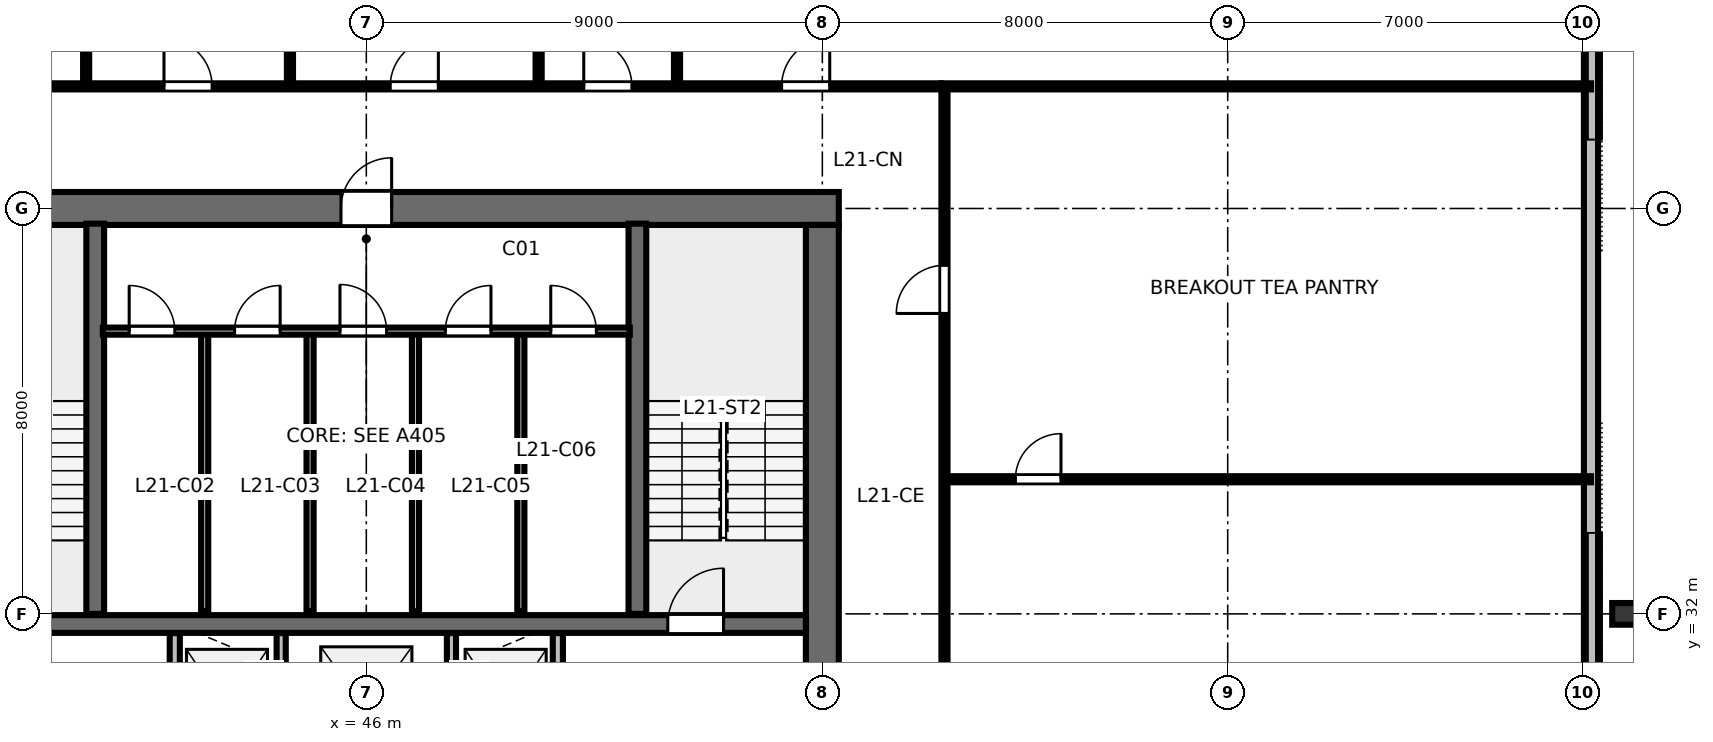
"""IFC4 building model, lengths in metres.
Left out: names, types, materials, properties, quantities, classifications, styles, units other than length and angle.
Written with IfcOpenShell. Run it as: python <this file> out.ifc"""

import sys

from ifc_helpers import new_model, si_unit, direction, frame, frame_2d, origin, origin_2d, place, context, subcontext, project, spatial, rectangle, i_section, extrude, element, fill, save


model = new_model("IFC4")
c1 = context("Model", 3, precision=1e-05, world=origin(), true_north=direction((0.0, 1.0)))
c2 = subcontext(c1, "Body", "Model", "MODEL_VIEW")
j1 = project(units=[si_unit("LENGTHUNIT", "METRE"), si_unit("PLANEANGLEUNIT", "RADIAN")], contexts=[c1])
p1 = place(None, origin())
s1 = spatial("IfcSite", under=j1, at=p1, CompositionType="ELEMENT")
p2 = place(p1, origin())
s2 = spatial("IfcBuilding", under=s1, at=p2, CompositionType="ELEMENT")
p3 = place(p2, frame((0.0, 0.0, 82.0)))
s3 = spatial("IfcBuildingStorey", under=s2, at=p3, CompositionType="ELEMENT", Elevation=82.0)
p4 = place(p3, frame((36.675, 40.0, 0.0), z_axis=(0.0, 0.0, 1.0), x_axis=(1.0, 0.0, 0.0)))
e1 = element("IfcWall", 1, at=p4, inside=s3, PredefinedType="SHEAR", context=c2, shape_type="SweptSolid", body=[
    extrude(rectangle(XDim=18.65, YDim=0.65, at=frame_2d((9.325, 0.0))), origin(), (0.0, 0.0, 1.0), 3.28),
])
p5 = place(p4, frame((8.825, 0.0, 0.0)))
e2 = element("IfcOpeningElement", 2, at=p5, cuts=e1, PredefinedType="OPENING", context=c2, shape_type="SweptSolid", body=[
    extrude(rectangle(XDim=1.0, YDim=2.15, at=frame_2d((0.5, 1.075))), frame((0.0, 0.335, 0.0), z_axis=(0.0, -1.0, 0.0), x_axis=(1.0, 0.0, 0.0)), (0.0, 0.0, 1.0), 0.67),
])
p6 = place(p3, frame((55.0, 24.325, 0.0), z_axis=(0.0, 0.0, 1.0), x_axis=(0.0, 1.0, 0.0)))
e3 = element("IfcWall", 3, at=p6, inside=s3, PredefinedType="SHEAR", context=c2, shape_type="SweptSolid", body=[
    extrude(rectangle(XDim=15.35, YDim=0.65, at=frame_2d((7.675, 0.0))), origin(), (0.0, 0.0, 1.0), 3.28),
])
p7 = place(p6, frame((5.2, 0.0, 0.0)))
e4 = element("IfcOpeningElement", 4, at=p7, cuts=e3, PredefinedType="OPENING", context=c2, shape_type="SweptSolid", body=[
    extrude(rectangle(XDim=1.15, YDim=2.15, at=frame_2d((0.575, 1.075))), frame((0.0, 0.335, 0.0), z_axis=(0.0, -1.0, 0.0), x_axis=(1.0, 0.0, 0.0)), (0.0, 0.0, 1.0), 0.67),
])
p8 = place(p3, frame((37.325, 31.8, 0.0), z_axis=(0.0, 0.0, 1.0), x_axis=(1.0, 0.0, 0.0)))
e5 = element("IfcWall", 5, at=p8, inside=s3, PredefinedType="SHEAR", context=c2, shape_type="SweptSolid", body=[
    extrude(rectangle(XDim=17.35, YDim=0.35, at=frame_2d((8.675, 0.0))), origin(), (0.0, 0.0, 1.0), 3.28),
])
p9 = place(p8, frame((0.725, 0.0, 0.0)))
e6 = element("IfcOpeningElement", 6, at=p9, cuts=e5, PredefinedType="OPENING", context=c2, shape_type="SweptSolid", body=[
    extrude(rectangle(XDim=1.1, YDim=2.15, at=frame_2d((0.55, 1.075))), frame((0.0, 0.185, 0.0), z_axis=(0.0, -1.0, 0.0), x_axis=(1.0, 0.0, 0.0)), (0.0, 0.0, 1.0), 0.37),
])
p10 = place(p8, frame((14.625, 0.0, 0.0)))
e7 = element("IfcOpeningElement", 7, at=p10, cuts=e5, PredefinedType="OPENING", context=c2, shape_type="SweptSolid", body=[
    extrude(rectangle(XDim=1.1, YDim=2.15, at=frame_2d((0.55, 1.075))), frame((0.0, 0.185, 0.0), z_axis=(0.0, -1.0, 0.0), x_axis=(1.0, 0.0, 0.0)), (0.0, 0.0, 1.0), 0.37),
])
p11 = place(p3, frame((70.83, 32.0, 0.0), z_axis=(-0.06599123705, 0.0, 0.997820202558), x_axis=(0.997820202558, 0.0, 0.06599123705)))
e8 = element("IfcColumn", 8, at=p11, inside=s3, PredefinedType="COLUMN", context=c2, shape_type="SweptSolid", body=[
    extrude(i_section(OverallWidth=0.428, OverallDepth=0.483, WebThickness=0.051, FlangeThickness=0.082, FilletRadius=0.025, at=origin_2d()), origin(), (0.0, 0.0, 1.0), 3.285),
])
p12 = place(p3, frame((70.17, 14.66, 0.0), z_axis=(0.0, 0.0, 1.0), x_axis=(0.0, 1.0, 0.0)))
e9 = element("IfcWall", 9, at=p12, inside=s3, PredefinedType="STANDARD", context=c2, shape_type="SweptSolid", body=[
    extrude(rectangle(XDim=34.68, YDim=0.28, at=frame_2d((17.34, 0.0))), origin(), (0.0, 0.0, 1.0), 3.28),
])
for number, where, z_axis, x_axis in (
    (10, (40.65, 32.0, 0.0), (0.0, 0.0, 1.0), (0.0, 1.0, 0.0)),
    (11, (51.35, 32.0, 0.0), (0.0, 0.0, 1.0), (0.0, 1.0, 0.0)),
):
    element("IfcWall", number, at=place(p3, frame(where, z_axis=z_axis, x_axis=x_axis)), inside=s3, PredefinedType="SHEAR", context=c2, shape_type="SweptSolid", body=[
        extrude(rectangle(XDim=7.7, YDim=0.35, at=frame_2d((3.85, 0.0))), origin(), (0.0, 0.0, 1.0), 3.6),
    ])
for number, where, z_axis, x_axis in (
    (12, (42.81, 32.05, 0.0), (0.0, 0.0, 1.0), (0.0, 1.0, 0.0)),
    (13, (44.89, 32.05, 0.0), (0.0, 0.0, 1.0), (0.0, 1.0, 0.0)),
    (14, (46.97, 32.05, 0.0), (0.0, 0.0, 1.0), (0.0, 1.0, 0.0)),
    (15, (49.05, 32.05, 0.0), (0.0, 0.0, 1.0), (0.0, 1.0, 0.0)),
):
    element("IfcWall", number, at=place(p3, frame(where, z_axis=z_axis, x_axis=x_axis)), inside=s3, PredefinedType="PARTITIONING", context=c2, shape_type="SweptSolid", body=[
        extrude(rectangle(XDim=5.5, YDim=0.14, at=frame_2d((2.75, 0.0))), origin(), (0.0, 0.0, 1.0), 3.28),
    ])
p13 = place(p3, frame((40.8, 37.58, 0.0), z_axis=(0.0, 0.0, 1.0), x_axis=(1.0, 0.0, 0.0)))
e16 = element("IfcWall", 16, at=p13, inside=s3, PredefinedType="PARTITIONING", context=c2, shape_type="SweptSolid", body=[
    extrude(rectangle(XDim=10.4, YDim=0.14, at=frame_2d((5.2, 0.0))), origin(), (0.0, 0.0, 1.0), 3.28),
])
p14 = place(p13, frame((0.52, 0.0, 0.0)))
e17 = element("IfcOpeningElement", 17, at=p14, cuts=e16, PredefinedType="OPENING", context=c2, shape_type="SweptSolid", body=[
    extrude(rectangle(XDim=0.9, YDim=2.15, at=frame_2d((0.45, 1.075))), frame((0.0, 0.08, 0.0), z_axis=(0.0, -1.0, 0.0), x_axis=(1.0, 0.0, 0.0)), (0.0, 0.0, 1.0), 0.16),
])
p15 = place(p13, frame((2.6, 0.0, 0.0)))
e18 = element("IfcOpeningElement", 18, at=p15, cuts=e16, PredefinedType="OPENING", context=c2, shape_type="SweptSolid", body=[
    extrude(rectangle(XDim=0.9, YDim=2.15, at=frame_2d((0.45, 1.075))), frame((0.0, 0.08, 0.0), z_axis=(0.0, -1.0, 0.0), x_axis=(1.0, 0.0, 0.0)), (0.0, 0.0, 1.0), 0.16),
])
p16 = place(p13, frame((4.68, 0.0, 0.0)))
e19 = element("IfcOpeningElement", 19, at=p16, cuts=e16, PredefinedType="OPENING", context=c2, shape_type="SweptSolid", body=[
    extrude(rectangle(XDim=0.92, YDim=2.15, at=frame_2d((0.46, 1.075))), frame((0.0, 0.08, 0.0), z_axis=(0.0, -1.0, 0.0), x_axis=(1.0, 0.0, 0.0)), (0.0, 0.0, 1.0), 0.16),
])
p17 = place(p13, frame((6.76, 0.0, 0.0)))
e20 = element("IfcOpeningElement", 20, at=p17, cuts=e16, PredefinedType="OPENING", context=c2, shape_type="SweptSolid", body=[
    extrude(rectangle(XDim=0.9, YDim=2.15, at=frame_2d((0.45, 1.075))), frame((0.0, 0.08, 0.0), z_axis=(0.0, -1.0, 0.0), x_axis=(1.0, 0.0, 0.0)), (0.0, 0.0, 1.0), 0.16),
])
p18 = place(p13, frame((8.84, 0.0, 0.0)))
e21 = element("IfcOpeningElement", 21, at=p18, cuts=e16, PredefinedType="OPENING", context=c2, shape_type="SweptSolid", body=[
    extrude(rectangle(XDim=0.9, YDim=2.15, at=frame_2d((0.45, 1.075))), frame((0.0, 0.08, 0.0), z_axis=(0.0, -1.0, 0.0), x_axis=(1.0, 0.0, 0.0)), (0.0, 0.0, 1.0), 0.16),
])
p19 = place(p3, frame((42.22, 28.58, 0.0), z_axis=(0.0, 0.0, 1.0), x_axis=(0.0, 1.0, 0.0)))
e22 = element("IfcWall", 22, at=p19, inside=s3, PredefinedType="PARTITIONING", context=c2, shape_type="SweptSolid", body=[
    extrude(rectangle(XDim=3.04, YDim=0.2, at=frame_2d((1.52, 0.0))), origin(), (0.0, 0.0, 1.0), 3.28),
])
p20 = place(p19, frame((0.95, 0.0, 0.0)))
e23 = element("IfcOpeningElement", 23, at=p20, cuts=e22, PredefinedType="OPENING", context=c2, shape_type="SweptSolid", body=[
    extrude(rectangle(XDim=1.05, YDim=2.15, at=frame_2d((0.525, 1.075))), frame((0.0, 0.11, 0.0), z_axis=(0.0, -1.0, 0.0), x_axis=(1.0, 0.0, 0.0)), (0.0, 0.0, 1.0), 0.22),
])
p21 = place(p3, frame((49.78, 28.58, 0.0), z_axis=(0.0, 0.0, 1.0), x_axis=(0.0, 1.0, 0.0)))
e24 = element("IfcWall", 24, at=p21, inside=s3, PredefinedType="PARTITIONING", context=c2, shape_type="SweptSolid", body=[
    extrude(rectangle(XDim=3.04, YDim=0.2, at=frame_2d((1.52, 0.0))), origin(), (0.0, 0.0, 1.0), 3.28),
])
p22 = place(p21, frame((0.95, 0.0, 0.0)))
e25 = element("IfcOpeningElement", 25, at=p22, cuts=e24, PredefinedType="OPENING", context=c2, shape_type="SweptSolid", body=[
    extrude(rectangle(XDim=1.05, YDim=2.15, at=frame_2d((0.525, 1.075))), frame((0.0, 0.11, 0.0), z_axis=(0.0, -1.0, 0.0), x_axis=(1.0, 0.0, 0.0)), (0.0, 0.0, 1.0), 0.22),
])
for number, where, z_axis, x_axis in (
    (26, (44.32, 28.58, 0.0), (0.0, 0.0, 1.0), (0.0, 1.0, 0.0)),
    (27, (47.68, 28.58, 0.0), (0.0, 0.0, 1.0), (0.0, 1.0, 0.0)),
):
    element("IfcWall", number, at=place(p3, frame(where, z_axis=z_axis, x_axis=x_axis)), inside=s3, PredefinedType="PARTITIONING", context=c2, shape_type="SweptSolid", body=[
        extrude(rectangle(XDim=3.04, YDim=0.18, at=frame_2d((1.52, 0.0))), origin(), (0.0, 0.0, 1.0), 3.28),
    ])
p23 = place(p3, frame((40.471, 42.41, 0.0), z_axis=(0.0, 0.0, 1.0), x_axis=(0.0, 1.0, 0.0)))
e28 = element("IfcWall", 28, at=p23, inside=s3, PredefinedType="PARTITIONING", context=c2, shape_type="SweptSolid", body=[
    extrude(rectangle(XDim=10.86, YDim=0.12, at=frame_2d((5.43, 0.0))), origin(), (0.0, 0.0, 1.0), 2.56),
])
p24 = place(p23, frame((1.4, 0.0, 0.0)))
e29 = element("IfcOpeningElement", 29, at=p24, cuts=e28, PredefinedType="OPENING", context=c2, shape_type="SweptSolid", body=[
    extrude(rectangle(XDim=0.9, YDim=2.15, at=frame_2d((0.45, 1.075))), frame((0.0, 0.07, 0.0), z_axis=(0.0, -1.0, 0.0), x_axis=(1.0, 0.0, 0.0)), (0.0, 0.0, 1.0), 0.14),
])
p25 = place(p3, frame((44.493, 42.41, 0.0), z_axis=(0.0, 0.0, 1.0), x_axis=(0.0, 1.0, 0.0)))
e30 = element("IfcWall", 30, at=p25, inside=s3, PredefinedType="PARTITIONING", context=c2, shape_type="SweptSolid", body=[
    extrude(rectangle(XDim=10.86, YDim=0.12, at=frame_2d((5.43, 0.0))), origin(), (0.0, 0.0, 1.0), 2.56),
])
p26 = place(p25, frame((1.4, 0.0, 0.0)))
e31 = element("IfcOpeningElement", 31, at=p26, cuts=e30, PredefinedType="OPENING", context=c2, shape_type="SweptSolid", body=[
    extrude(rectangle(XDim=0.9, YDim=2.15, at=frame_2d((0.45, 1.075))), frame((0.0, 0.07, 0.0), z_axis=(0.0, -1.0, 0.0), x_axis=(1.0, 0.0, 0.0)), (0.0, 0.0, 1.0), 0.14),
])
p27 = place(p3, frame((49.401, 42.41, 0.0), z_axis=(0.0, 0.0, 1.0), x_axis=(0.0, 1.0, 0.0)))
e32 = element("IfcWall", 32, at=p27, inside=s3, PredefinedType="PARTITIONING", context=c2, shape_type="SweptSolid", body=[
    extrude(rectangle(XDim=10.86, YDim=0.12, at=frame_2d((5.43, 0.0))), origin(), (0.0, 0.0, 1.0), 2.56),
])
p28 = place(p27, frame((1.4, 0.0, 0.0)))
e33 = element("IfcOpeningElement", 33, at=p28, cuts=e32, PredefinedType="OPENING", context=c2, shape_type="SweptSolid", body=[
    extrude(rectangle(XDim=0.9, YDim=2.15, at=frame_2d((0.45, 1.075))), frame((0.0, 0.07, 0.0), z_axis=(0.0, -1.0, 0.0), x_axis=(1.0, 0.0, 0.0)), (0.0, 0.0, 1.0), 0.14),
])
p29 = place(p3, frame((52.132, 42.41, 0.0), z_axis=(0.0, 0.0, 1.0), x_axis=(0.0, 1.0, 0.0)))
e34 = element("IfcWall", 34, at=p29, inside=s3, PredefinedType="PARTITIONING", context=c2, shape_type="SweptSolid", body=[
    extrude(rectangle(XDim=10.86, YDim=0.12, at=frame_2d((5.43, 0.0))), origin(), (0.0, 0.0, 1.0), 2.56),
])
p30 = place(p29, frame((1.4, 0.0, 0.0)))
e35 = element("IfcOpeningElement", 35, at=p30, cuts=e34, PredefinedType="OPENING", context=c2, shape_type="SweptSolid", body=[
    extrude(rectangle(XDim=0.9, YDim=2.15, at=frame_2d((0.45, 1.075))), frame((0.0, 0.07, 0.0), z_axis=(0.0, -1.0, 0.0), x_axis=(1.0, 0.0, 0.0)), (0.0, 0.0, 1.0), 0.14),
])
p31 = place(p3, frame((34.65, 42.41, 0.0), z_axis=(0.0, 0.0, 1.0), x_axis=(1.0, 0.0, 0.0)))
e36 = element("IfcWall", 36, at=p31, inside=s3, PredefinedType="PARTITIONING", context=c2, shape_type="SweptSolid", body=[
    extrude(rectangle(XDim=22.7, YDim=0.12, at=frame_2d((11.35, 0.0))), origin(), (0.0, 0.0, 1.0), 2.56),
])
p32 = place(p31, frame((2.505, 0.0, 0.0)))
e37 = element("IfcOpeningElement", 37, at=p32, cuts=e36, PredefinedType="OPENING", context=c2, shape_type="SweptSolid", body=[
    extrude(rectangle(XDim=0.95, YDim=2.15, at=frame_2d((0.475, 1.075))), frame((0.0, 0.07, 0.0), z_axis=(0.0, -1.0, 0.0), x_axis=(1.0, 0.0, 0.0)), (0.0, 0.0, 1.0), 0.14),
])
p33 = place(p31, frame((7.357, 0.0, 0.0)))
e38 = element("IfcOpeningElement", 38, at=p33, cuts=e36, PredefinedType="OPENING", context=c2, shape_type="SweptSolid", body=[
    extrude(rectangle(XDim=0.95, YDim=2.15, at=frame_2d((0.475, 1.075))), frame((0.0, 0.07, 0.0), z_axis=(0.0, -1.0, 0.0), x_axis=(1.0, 0.0, 0.0)), (0.0, 0.0, 1.0), 0.14),
])
p34 = place(p31, frame((11.822, 0.0, 0.0)))
e39 = element("IfcOpeningElement", 39, at=p34, cuts=e36, PredefinedType="OPENING", context=c2, shape_type="SweptSolid", body=[
    extrude(rectangle(XDim=0.95, YDim=2.15, at=frame_2d((0.475, 1.075))), frame((0.0, 0.07, 0.0), z_axis=(0.0, -1.0, 0.0), x_axis=(1.0, 0.0, 0.0)), (0.0, 0.0, 1.0), 0.14),
])
p35 = place(p31, frame((15.641, 0.0, 0.0)))
e40 = element("IfcOpeningElement", 40, at=p35, cuts=e36, PredefinedType="OPENING", context=c2, shape_type="SweptSolid", body=[
    extrude(rectangle(XDim=0.95, YDim=2.15, at=frame_2d((0.475, 1.075))), frame((0.0, 0.07, 0.0), z_axis=(0.0, -1.0, 0.0), x_axis=(1.0, 0.0, 0.0)), (0.0, 0.0, 1.0), 0.14),
])
p36 = place(p31, frame((19.546, 0.0, 0.0)))
e41 = element("IfcOpeningElement", 41, at=p36, cuts=e36, PredefinedType="OPENING", context=c2, shape_type="SweptSolid", body=[
    extrude(rectangle(XDim=0.95, YDim=2.15, at=frame_2d((0.475, 1.075))), frame((0.0, 0.07, 0.0), z_axis=(0.0, -1.0, 0.0), x_axis=(1.0, 0.0, 0.0)), (0.0, 0.0, 1.0), 0.14),
])
p37 = place(p3, frame((57.41, 34.656, 0.0), z_axis=(0.0, 0.0, 1.0), x_axis=(1.0, 0.0, 0.0)))
e42 = element("IfcWall", 42, at=p37, inside=s3, PredefinedType="PARTITIONING", context=c2, shape_type="SweptSolid", body=[
    extrude(rectangle(XDim=12.76, YDim=0.12, at=frame_2d((6.38, 0.0))), origin(), (0.0, 0.0, 1.0), 2.56),
])
p38 = place(p37, frame((1.4, 0.0, 0.0)))
e43 = element("IfcOpeningElement", 43, at=p38, cuts=e42, PredefinedType="OPENING", context=c2, shape_type="SweptSolid", body=[
    extrude(rectangle(XDim=0.9, YDim=2.15, at=frame_2d((0.45, 1.075))), frame((0.0, 0.07, 0.0), z_axis=(0.0, -1.0, 0.0), x_axis=(1.0, 0.0, 0.0)), (0.0, 0.0, 1.0), 0.14),
])
p39 = place(p3, frame((57.41, 21.65, 0.0), z_axis=(0.0, 0.0, 1.0), x_axis=(0.0, 1.0, 0.0)))
e44 = element("IfcWall", 44, at=p39, inside=s3, PredefinedType="PARTITIONING", context=c2, shape_type="SweptSolid", body=[
    extrude(rectangle(XDim=20.7, YDim=0.12, at=frame_2d((10.35, 0.0))), origin(), (0.0, 0.0, 1.0), 2.56),
])
p40 = place(p39, frame((6.128, 0.0, 0.0)))
e45 = element("IfcOpeningElement", 45, at=p40, cuts=e44, PredefinedType="OPENING", context=c2, shape_type="SweptSolid", body=[
    extrude(rectangle(XDim=0.95, YDim=2.15, at=frame_2d((0.475, 1.075))), frame((0.0, 0.07, 0.0), z_axis=(0.0, -1.0, 0.0), x_axis=(1.0, 0.0, 0.0)), (0.0, 0.0, 1.0), 0.14),
])
p41 = place(p39, frame((16.278, 0.0, 0.0)))
e46 = element("IfcOpeningElement", 46, at=p41, cuts=e44, PredefinedType="OPENING", context=c2, shape_type="SweptSolid", body=[
    extrude(rectangle(XDim=0.95, YDim=2.15, at=frame_2d((0.475, 1.075))), frame((0.0, 0.07, 0.0), z_axis=(0.0, -1.0, 0.0), x_axis=(1.0, 0.0, 0.0)), (0.0, 0.0, 1.0), 0.14),
])
p42 = place(p3, frame((57.35, 42.41, 0.0), z_axis=(0.0, 0.0, 1.0), x_axis=(1.0, 0.0, 0.0)))
e47 = element("IfcWall", 47, at=p42, inside=s3, PredefinedType="PARTITIONING", context=c2, shape_type="SweptSolid", body=[
    extrude(rectangle(XDim=12.82, YDim=0.12, at=frame_2d((6.41, 0.0))), origin(), (0.0, 0.0, 1.0), 2.56),
])
p43 = place(p10, origin())
e48 = element("IfcDoor", 48, at=p43, inside=s3, OperationType="SINGLE_SWING_RIGHT", PredefinedType="DOOR", context=c2, shape_type="SweptSolid", body=[
    extrude(rectangle(XDim=1.1, YDim=2.15, at=frame_2d((0.55, 1.075))), frame((0.0, 0.025, 0.0), z_axis=(0.0, -1.0, 0.0), x_axis=(1.0, 0.0, 0.0)), (0.0, 0.0, 1.0), 0.05),
])
fill(e7, e48)
p44 = place(p5, origin())
e49 = element("IfcDoor", 49, at=p44, inside=s3, OperationType="SINGLE_SWING_RIGHT", PredefinedType="DOOR", context=c2, shape_type="SweptSolid", body=[
    extrude(rectangle(XDim=1.0, YDim=2.15, at=frame_2d((0.5, 1.075))), frame((0.0, 0.025, 0.0), z_axis=(0.0, -1.0, 0.0), x_axis=(1.0, 0.0, 0.0)), (0.0, 0.0, 1.0), 0.05),
])
fill(e2, e49)
p45 = place(p14, origin())
e50 = element("IfcDoor", 50, at=p45, inside=s3, OperationType="SINGLE_SWING_LEFT", PredefinedType="DOOR", context=c2, shape_type="SweptSolid", body=[
    extrude(rectangle(XDim=0.9, YDim=2.15, at=frame_2d((0.45, 1.075))), frame((0.0, 0.025, 0.0), z_axis=(0.0, -1.0, 0.0), x_axis=(1.0, 0.0, 0.0)), (0.0, 0.0, 1.0), 0.05),
])
fill(e17, e50)
p46 = place(p15, origin())
e51 = element("IfcDoor", 51, at=p46, inside=s3, OperationType="SINGLE_SWING_RIGHT", PredefinedType="DOOR", context=c2, shape_type="SweptSolid", body=[
    extrude(rectangle(XDim=0.9, YDim=2.15, at=frame_2d((0.45, 1.075))), frame((0.0, 0.025, 0.0), z_axis=(0.0, -1.0, 0.0), x_axis=(1.0, 0.0, 0.0)), (0.0, 0.0, 1.0), 0.05),
])
fill(e18, e51)
p47 = place(p16, origin())
e52 = element("IfcDoor", 52, at=p47, inside=s3, OperationType="SINGLE_SWING_LEFT", PredefinedType="DOOR", context=c2, shape_type="SweptSolid", body=[
    extrude(rectangle(XDim=0.92, YDim=2.15, at=frame_2d((0.46, 1.075))), frame((0.0, 0.025, 0.0), z_axis=(0.0, -1.0, 0.0), x_axis=(1.0, 0.0, 0.0)), (0.0, 0.0, 1.0), 0.05),
])
fill(e19, e52)
p48 = place(p17, origin())
e53 = element("IfcDoor", 53, at=p48, inside=s3, OperationType="SINGLE_SWING_RIGHT", PredefinedType="DOOR", context=c2, shape_type="SweptSolid", body=[
    extrude(rectangle(XDim=0.9, YDim=2.15, at=frame_2d((0.45, 1.075))), frame((0.0, 0.025, 0.0), z_axis=(0.0, -1.0, 0.0), x_axis=(1.0, 0.0, 0.0)), (0.0, 0.0, 1.0), 0.05),
])
fill(e20, e53)
p49 = place(p18, origin())
e54 = element("IfcDoor", 54, at=p49, inside=s3, OperationType="SINGLE_SWING_LEFT", PredefinedType="DOOR", context=c2, shape_type="SweptSolid", body=[
    extrude(rectangle(XDim=0.9, YDim=2.15, at=frame_2d((0.45, 1.075))), frame((0.0, 0.025, 0.0), z_axis=(0.0, -1.0, 0.0), x_axis=(1.0, 0.0, 0.0)), (0.0, 0.0, 1.0), 0.05),
])
fill(e21, e54)
p50 = place(p33, origin())
e55 = element("IfcDoor", 55, at=p50, inside=s3, OperationType="SINGLE_SWING_LEFT", PredefinedType="DOOR", context=c2, shape_type="SweptSolid", body=[
    extrude(rectangle(XDim=0.95, YDim=2.15, at=frame_2d((0.475, 1.075))), frame((0.0, 0.025, 0.0), z_axis=(0.0, -1.0, 0.0), x_axis=(1.0, 0.0, 0.0)), (0.0, 0.0, 1.0), 0.05),
])
fill(e38, e55)
p51 = place(p34, origin())
e56 = element("IfcDoor", 56, at=p51, inside=s3, OperationType="SINGLE_SWING_RIGHT", PredefinedType="DOOR", context=c2, shape_type="SweptSolid", body=[
    extrude(rectangle(XDim=0.95, YDim=2.15, at=frame_2d((0.475, 1.075))), frame((0.0, 0.025, 0.0), z_axis=(0.0, -1.0, 0.0), x_axis=(1.0, 0.0, 0.0)), (0.0, 0.0, 1.0), 0.05),
])
fill(e39, e56)
p52 = place(p35, origin())
e57 = element("IfcDoor", 57, at=p52, inside=s3, OperationType="SINGLE_SWING_LEFT", PredefinedType="DOOR", context=c2, shape_type="SweptSolid", body=[
    extrude(rectangle(XDim=0.95, YDim=2.15, at=frame_2d((0.475, 1.075))), frame((0.0, 0.025, 0.0), z_axis=(0.0, -1.0, 0.0), x_axis=(1.0, 0.0, 0.0)), (0.0, 0.0, 1.0), 0.05),
])
fill(e40, e57)
p53 = place(p36, origin())
e58 = element("IfcDoor", 58, at=p53, inside=s3, OperationType="SINGLE_SWING_RIGHT", PredefinedType="DOOR", context=c2, shape_type="SweptSolid", body=[
    extrude(rectangle(XDim=0.95, YDim=2.15, at=frame_2d((0.475, 1.075))), frame((0.0, 0.025, 0.0), z_axis=(0.0, -1.0, 0.0), x_axis=(1.0, 0.0, 0.0)), (0.0, 0.0, 1.0), 0.05),
])
fill(e41, e58)
p54 = place(p38, origin())
e59 = element("IfcDoor", 59, at=p54, inside=s3, OperationType="SINGLE_SWING_RIGHT", PredefinedType="DOOR", context=c2, shape_type="SweptSolid", body=[
    extrude(rectangle(XDim=0.9, YDim=2.15, at=frame_2d((0.45, 1.075))), frame((0.0, 0.025, 0.0), z_axis=(0.0, -1.0, 0.0), x_axis=(1.0, 0.0, 0.0)), (0.0, 0.0, 1.0), 0.05),
])
fill(e43, e59)
p55 = place(p41, origin())
e60 = element("IfcDoor", 60, at=p55, inside=s3, OperationType="SINGLE_SWING_LEFT", PredefinedType="DOOR", context=c2, shape_type="SweptSolid", body=[
    extrude(rectangle(XDim=0.95, YDim=2.15, at=frame_2d((0.475, 1.075))), frame((0.0, 0.025, 0.0), z_axis=(0.0, -1.0, 0.0), x_axis=(1.0, 0.0, 0.0)), (0.0, 0.0, 1.0), 0.05),
])
fill(e46, e60)
save(model, sys.argv[1])
